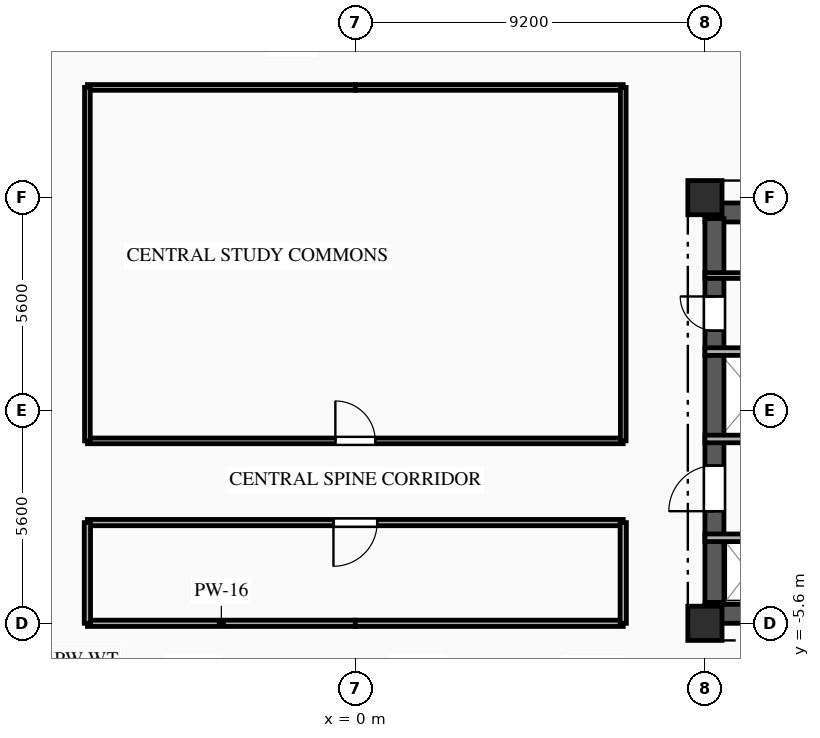
"""IFC4 building model, lengths in metres.
Left out: names, types, materials, properties, quantities, classifications, styles, units other than length and angle.
Written with IfcOpenShell. Run it as: python <this file> out.ifc"""

import sys

from ifc_helpers import new_model, si_unit, direction, frame, frame_2d, origin, origin_2d, place, context, subcontext, project, spatial, rectangle, extrude, element, fill, save


model = new_model("IFC4")
c1 = context("Model", 3, precision=1e-05, world=origin(), true_north=direction((0.0, 1.0)))
c2 = subcontext(c1, "Body", "Model", "MODEL_VIEW")
j1 = project(units=[si_unit("LENGTHUNIT", "METRE"), si_unit("PLANEANGLEUNIT", "RADIAN")], contexts=[c1])
p1 = place(None, origin())
s1 = spatial("IfcSite", under=j1, at=p1, CompositionType="ELEMENT")
p2 = place(p1, origin())
s2 = spatial("IfcBuilding", under=s1, at=p2, CompositionType="ELEMENT")
p3 = place(p2, frame((0.0, 0.0, 154.45)))
s3 = spatial("IfcBuildingStorey", under=s2, at=p3, CompositionType="ELEMENT", Elevation=154.45)
for number, where, z_axis, x_axis in (
    (1, (9.2, -5.6, 0.0), (0.0, 0.0, 1.0), (1.0, 0.0, 0.0)),
    (2, (9.2, 5.6, 0.0), (0.0, 0.0, 1.0), (1.0, 0.0, 0.0)),
):
    element("IfcColumn", number, at=place(p3, frame(where, z_axis=z_axis, x_axis=x_axis)), inside=s3, PredefinedType="COLUMN", context=c2, shape_type="SweptSolid", body=[
        extrude(rectangle(XDim=0.9, YDim=0.9, at=origin_2d()), origin(), (0.0, 0.0, 1.0), 3.35),
    ])
p4 = place(p3, frame((9.2, 5.21, 0.0), z_axis=(0.0, 0.0, 1.0), x_axis=(1.0, 0.0, 0.0)))
e3 = element("IfcWall", 3, at=p4, inside=s3, PredefinedType="SHEAR", context=c2, shape_type="SweptSolid", body=[
    extrude(rectangle(XDim=9.6, YDim=0.5, at=frame_2d((4.8, 0.0))), origin(), (0.0, 0.0, 1.0), 3.04),
])
p5 = place(p4, frame((6.95, 0.0, 0.0)))
e4 = element("IfcOpeningElement", 4, at=p5, cuts=e3, PredefinedType="OPENING", context=c2, shape_type="SweptSolid", body=[
    extrude(rectangle(XDim=1.1, YDim=2.15, at=frame_2d((0.55, 1.075))), frame((0.0, 0.26, 0.0), z_axis=(0.0, -1.0, 0.0), x_axis=(1.0, 0.0, 0.0)), (0.0, 0.0, 1.0), 0.52),
])
p6 = place(p4, frame((3.775, 0.0, 0.0)))
e5 = element("IfcOpeningElement", 5, at=p6, cuts=e3, PredefinedType="OPENING", context=c2, shape_type="SweptSolid", body=[
    extrude(rectangle(XDim=1.05, YDim=2.1, at=frame_2d((0.525, 1.05))), frame((0.0, 0.26, 0.0), z_axis=(0.0, -1.0, 0.0), x_axis=(1.0, 0.0, 0.0)), (0.0, 0.0, 1.0), 0.52),
])
p7 = place(p3, frame((9.2, -5.35, 0.0), z_axis=(0.0, 0.0, 1.0), x_axis=(1.0, 0.0, 0.0)))
e6 = element("IfcWall", 6, at=p7, inside=s3, PredefinedType="SHEAR", context=c2, shape_type="SweptSolid", body=[
    extrude(rectangle(XDim=9.6, YDim=0.5, at=frame_2d((4.8, 0.0))), origin(), (0.0, 0.0, 1.0), 3.04),
])
p8 = place(p7, frame((7.65, 0.0, 0.0)))
e7 = element("IfcOpeningElement", 7, at=p8, cuts=e6, PredefinedType="OPENING", context=c2, shape_type="SweptSolid", body=[
    extrude(rectangle(XDim=0.9, YDim=2.1, at=frame_2d((0.45, 1.05))), frame((0.0, 0.26, 0.0), z_axis=(0.0, -1.0, 0.0), x_axis=(1.0, 0.0, 0.0)), (0.0, 0.0, 1.0), 0.52),
])
p9 = place(p3, frame((9.45, -5.05, 0.0), z_axis=(0.0, 0.0, 1.0), x_axis=(0.0, 1.0, 0.0)))
e8 = element("IfcWall", 8, at=p9, inside=s3, PredefinedType="SHEAR", context=c2, shape_type="SweptSolid", body=[
    extrude(rectangle(XDim=10.1, YDim=0.5, at=frame_2d((5.05, 0.0))), origin(), (0.0, 0.0, 1.0), 3.04),
])
p10 = place(p9, frame((7.15, 0.0, 0.0)))
e9 = element("IfcOpeningElement", 9, at=p10, cuts=e8, PredefinedType="OPENING", context=c2, shape_type="SweptSolid", body=[
    extrude(rectangle(XDim=0.9, YDim=2.1, at=frame_2d((0.45, 1.05))), frame((0.0, 0.26, 0.0), z_axis=(0.0, -1.0, 0.0), x_axis=(1.0, 0.0, 0.0)), (0.0, 0.0, 1.0), 0.52),
])
p11 = place(p9, frame((2.4, 0.0, 0.0)))
e10 = element("IfcOpeningElement", 10, at=p11, cuts=e8, PredefinedType="OPENING", context=c2, shape_type="SweptSolid", body=[
    extrude(rectangle(XDim=1.2, YDim=2.15, at=frame_2d((0.6, 1.075))), frame((0.0, 0.26, 0.0), z_axis=(0.0, -1.0, 0.0), x_axis=(1.0, 0.0, 0.0)), (0.0, 0.0, 1.0), 0.52),
])
p12 = place(p3, frame((12.15, 3.55, 0.0), z_axis=(0.0, 0.0, 1.0), x_axis=(-1.0, 0.0, 0.0)))
e11 = element("IfcWall", 11, at=p12, inside=s3, PredefinedType="PARTITIONING", context=c2, shape_type="SweptSolid", body=[
    extrude(rectangle(XDim=2.95, YDim=0.15, at=frame_2d((1.475, 0.0))), origin(), (0.0, 0.0, 1.0), 3.04),
])
p13 = place(p12, frame((0.325, 0.0, 0.0)))
e12 = element("IfcOpeningElement", 12, at=p13, cuts=e11, PredefinedType="OPENING", context=c2, shape_type="SweptSolid", body=[
    extrude(rectangle(XDim=0.95, YDim=2.1, at=frame_2d((0.475, 1.05))), frame((0.0, 0.085, 0.0), z_axis=(0.0, -1.0, 0.0), x_axis=(1.0, 0.0, 0.0)), (0.0, 0.0, 1.0), 0.17),
])
p14 = place(p3, frame((9.2, -3.35, 0.0), z_axis=(0.0, 0.0, 1.0), x_axis=(1.0, 0.0, 0.0)))
e13 = element("IfcWall", 13, at=p14, inside=s3, PredefinedType="PARTITIONING", context=c2, shape_type="SweptSolid", body=[
    extrude(rectangle(XDim=1.88, YDim=0.2, at=frame_2d((0.94, 0.0))), origin(), (0.0, 0.0, 1.0), 2.755),
])
p15 = place(p3, frame((11.46, -0.75, 0.0), z_axis=(0.0, 0.0, 1.0), x_axis=(-1.0, 0.0, 0.0)))
e14 = element("IfcWall", 14, at=p15, inside=s3, PredefinedType="PARTITIONING", context=c2, shape_type="SweptSolid", body=[
    extrude(rectangle(XDim=2.26, YDim=0.2, at=frame_2d((1.13, 0.0))), origin(), (0.0, 0.0, 1.0), 3.04),
])
for number, where, z_axis, x_axis in (
    (15, (0.0, 8.5, 0.0), (0.0, 0.0, 1.0), (-1.0, 0.0, 0.0)),
    (16, (7.05, 8.5, 0.0), (0.0, 0.0, 1.0), (-1.0, 0.0, 0.0)),
):
    element("IfcWall", number, at=place(p3, frame(where, z_axis=z_axis, x_axis=x_axis)), inside=s3, PredefinedType="PARTITIONING", context=c2, shape_type="SweptSolid", body=[
        extrude(rectangle(XDim=7.05, YDim=0.15, at=frame_2d((3.525, 0.0))), origin(), (0.0, 0.0, 1.0), 3.04),
    ])
for number, where, z_axis, x_axis in (
    (17, (-7.05, -5.6, 0.0), (0.0, 0.0, 1.0), (1.0, 0.0, 0.0)),
    (18, (0.0, -5.6, 0.0), (0.0, 0.0, 1.0), (1.0, 0.0, 0.0)),
):
    element("IfcWall", number, at=place(p3, frame(where, z_axis=z_axis, x_axis=x_axis)), inside=s3, PredefinedType="PARTITIONING", context=c2, shape_type="SweptSolid", body=[
        extrude(rectangle(XDim=7.05, YDim=0.165, at=frame_2d((3.525, 0.0))), origin(), (0.0, 0.0, 1.0), 2.525),
    ])
p16 = place(p3, frame((-7.05, -0.8, 0.0), z_axis=(0.0, 0.0, 1.0), x_axis=(1.0, 0.0, 0.0)))
e19 = element("IfcWall", 19, at=p16, inside=s3, PredefinedType="PARTITIONING", context=c2, shape_type="SweptSolid", body=[
    extrude(rectangle(XDim=14.1, YDim=0.15, at=frame_2d((7.05, 0.0))), origin(), (0.0, 0.0, 1.0), 3.04),
])
p17 = place(p16, frame((6.525, 0.0, 0.0)))
e20 = element("IfcOpeningElement", 20, at=p17, cuts=e19, PredefinedType="OPENING", context=c2, shape_type="SweptSolid", body=[
    extrude(rectangle(XDim=1.05, YDim=2.15, at=frame_2d((0.525, 1.075))), frame((0.0, 0.085, 0.0), z_axis=(0.0, -1.0, 0.0), x_axis=(1.0, 0.0, 0.0)), (0.0, 0.0, 1.0), 0.17),
])
p18 = place(p3, frame((7.05, -2.95, 0.0), z_axis=(0.0, 0.0, 1.0), x_axis=(-1.0, 0.0, 0.0)))
e21 = element("IfcWall", 21, at=p18, inside=s3, PredefinedType="PARTITIONING", context=c2, shape_type="SweptSolid", body=[
    extrude(rectangle(XDim=14.1, YDim=0.165, at=frame_2d((7.05, 0.0))), origin(), (0.0, 0.0, 1.0), 3.04),
])
p19 = place(p18, frame((6.475, 0.0, 0.0)))
e22 = element("IfcOpeningElement", 22, at=p19, cuts=e21, PredefinedType="OPENING", context=c2, shape_type="SweptSolid", body=[
    extrude(rectangle(XDim=1.15, YDim=2.15, at=frame_2d((0.575, 1.075))), frame((0.0, 0.093, 0.0), z_axis=(0.0, -1.0, 0.0), x_axis=(1.0, 0.0, 0.0)), (0.0, 0.0, 1.0), 0.185),
])
p20 = place(p3, frame((-7.05, 8.5, 0.0), z_axis=(0.0, 0.0, 1.0), x_axis=(0.0, -1.0, 0.0)))
e23 = element("IfcWall", 23, at=p20, inside=s3, PredefinedType="PARTITIONING", context=c2, shape_type="SweptSolid", body=[
    extrude(rectangle(XDim=9.3, YDim=0.15, at=frame_2d((4.65, 0.0))), origin(), (0.0, 0.0, 1.0), 3.04),
])
p21 = place(p3, frame((-7.05, -2.95, 0.0), z_axis=(0.0, 0.0, 1.0), x_axis=(0.0, -1.0, 0.0)))
e24 = element("IfcWall", 24, at=p21, inside=s3, PredefinedType="PARTITIONING", context=c2, shape_type="SweptSolid", body=[
    extrude(rectangle(XDim=2.65, YDim=0.165, at=frame_2d((1.325, 0.0))), origin(), (0.0, 0.0, 1.0), 3.04),
])
p22 = place(p3, frame((7.05, -0.8, 0.0), z_axis=(0.0, 0.0, 1.0), x_axis=(0.0, 1.0, 0.0)))
e25 = element("IfcWall", 25, at=p22, inside=s3, PredefinedType="PARTITIONING", context=c2, shape_type="SweptSolid", body=[
    extrude(rectangle(XDim=9.3, YDim=0.15, at=frame_2d((4.65, 0.0))), origin(), (0.0, 0.0, 1.0), 3.04),
])
p23 = place(p3, frame((7.05, -5.6, 0.0), z_axis=(0.0, 0.0, 1.0), x_axis=(0.0, 1.0, 0.0)))
e26 = element("IfcWall", 26, at=p23, inside=s3, PredefinedType="PARTITIONING", context=c2, shape_type="SweptSolid", body=[
    extrude(rectangle(XDim=2.65, YDim=0.165, at=frame_2d((1.325, 0.0))), origin(), (0.0, 0.0, 1.0), 3.04),
])
p24 = place(p3, frame((9.2, 1.55, 0.0), z_axis=(0.0, 0.0, 1.0), x_axis=(1.0, 0.0, 0.0)))
e27 = element("IfcWall", 27, at=p24, inside=s3, PredefinedType="PARTITIONING", context=c2, shape_type="SweptSolid", body=[
    extrude(rectangle(XDim=5.82, YDim=0.2, at=frame_2d((2.91, 0.0))), origin(), (0.0, 0.0, 1.0), 3.04),
])
p25 = place(p10, origin())
e28 = element("IfcDoor", 28, at=p25, inside=s3, OperationType="SINGLE_SWING_RIGHT", PredefinedType="DOOR", context=c2, shape_type="SweptSolid", body=[
    extrude(rectangle(XDim=0.9, YDim=2.1, at=frame_2d((0.45, 1.05))), frame((0.0, 0.025, 0.0), z_axis=(0.0, -1.0, 0.0), x_axis=(1.0, 0.0, 0.0)), (0.0, 0.0, 1.0), 0.05),
])
fill(e9, e28)
p26 = place(p11, origin())
e29 = element("IfcDoor", 29, at=p26, inside=s3, OperationType="SINGLE_SWING_LEFT", PredefinedType="DOOR", context=c2, shape_type="SweptSolid", body=[
    extrude(rectangle(XDim=1.2, YDim=2.15, at=frame_2d((0.6, 1.075))), frame((0.0, 0.025, 0.0), z_axis=(0.0, -1.0, 0.0), x_axis=(1.0, 0.0, 0.0)), (0.0, 0.0, 1.0), 0.05),
])
fill(e10, e29)
p27 = place(p17, origin())
e30 = element("IfcDoor", 30, at=p27, inside=s3, OperationType="SINGLE_SWING_LEFT", PredefinedType="DOOR", context=c2, shape_type="SweptSolid", body=[
    extrude(rectangle(XDim=1.05, YDim=2.15, at=frame_2d((0.525, 1.075))), frame((0.0, 0.025, 0.0), z_axis=(0.0, -1.0, 0.0), x_axis=(1.0, 0.0, 0.0)), (0.0, 0.0, 1.0), 0.05),
])
fill(e20, e30)
p28 = place(p19, origin())
e31 = element("IfcDoor", 31, at=p28, inside=s3, OperationType="SINGLE_SWING_RIGHT", PredefinedType="DOOR", context=c2, shape_type="SweptSolid", body=[
    extrude(rectangle(XDim=1.15, YDim=2.15, at=frame_2d((0.575, 1.075))), frame((0.0, 0.025, 0.0), z_axis=(0.0, -1.0, 0.0), x_axis=(1.0, 0.0, 0.0)), (0.0, 0.0, 1.0), 0.05),
])
fill(e22, e31)
save(model, sys.argv[1])
